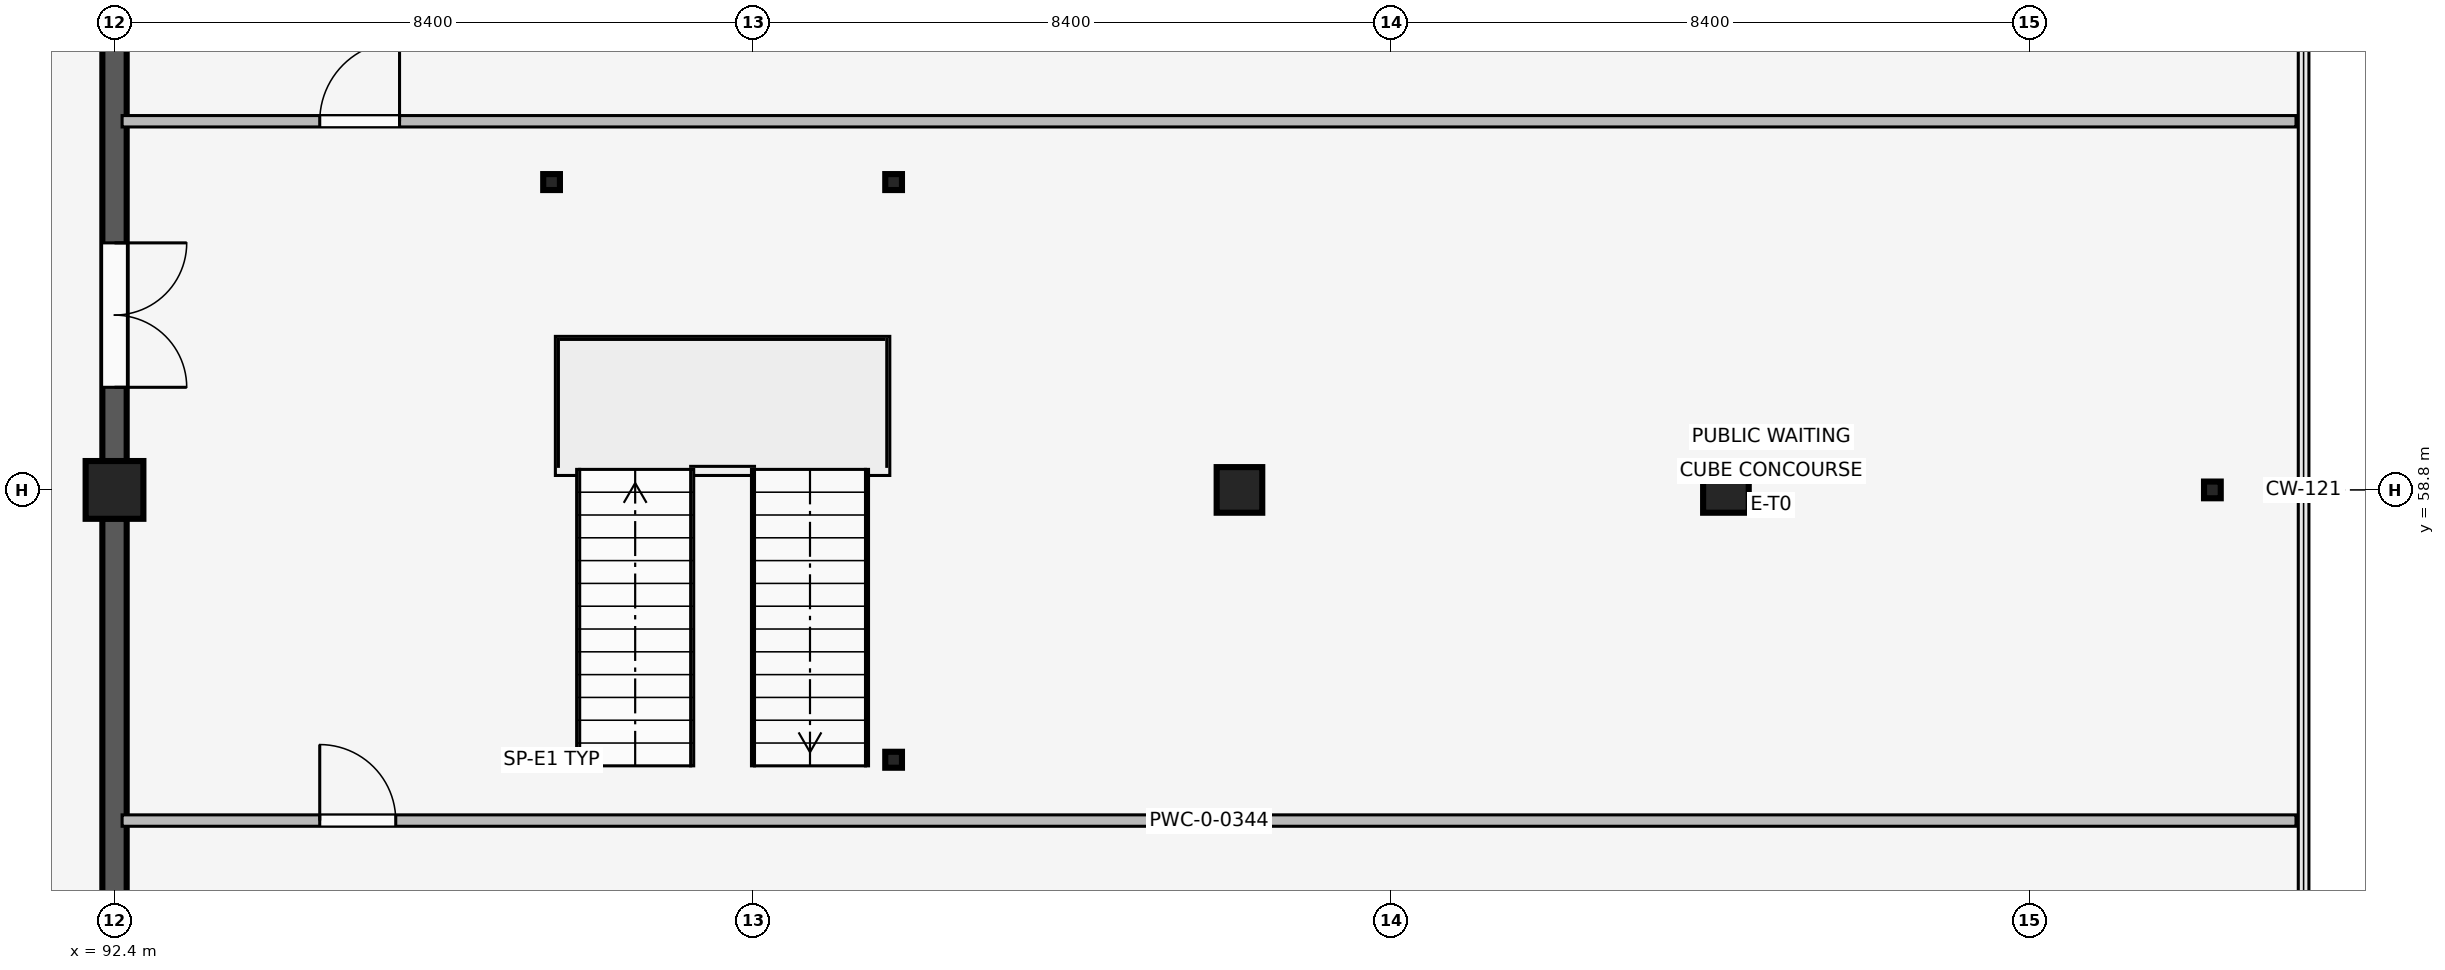
"""IFC4 building model, lengths in metres.
Left out: names, types, materials, properties, quantities, classifications, styles, units other than length and angle.
Written with IfcOpenShell. Run it as: python <this file> out.ifc"""

import sys

from ifc_helpers import new_model, si_unit, direction, frame, frame_2d, origin, origin_2d, place, context, subcontext, project, spatial, rectangle, i_section, extrude, element, fill, save


model = new_model("IFC4")
c1 = context("Model", 3, precision=1e-05, world=origin(), true_north=direction((0.0, 1.0)))
c2 = subcontext(c1, "Body", "Model", "MODEL_VIEW")
j1 = project(units=[si_unit("LENGTHUNIT", "METRE"), si_unit("PLANEANGLEUNIT", "RADIAN")], contexts=[c1])
p1 = place(None, origin())
s1 = spatial("IfcSite", under=j1, at=p1, CompositionType="ELEMENT")
p2 = place(p1, origin())
s2 = spatial("IfcBuilding", under=s1, at=p2, CompositionType="ELEMENT")
p3 = place(p2, origin())
s3 = spatial("IfcBuildingStorey", under=s2, at=p3, CompositionType="ELEMENT", Elevation=0.0)
p4 = place(p3, frame((92.4, 58.8, 0.0), z_axis=(0.0, 0.0, 1.0), x_axis=(1.0, 0.0, 0.0)))
e1 = element("IfcColumn", 1, at=p4, inside=s3, PredefinedType="COLUMN", context=c2, shape_type="SweptSolid", body=[
    extrude(rectangle(XDim=0.76, YDim=0.76, at=origin_2d()), origin(), (0.0, 0.0, 1.0), 4.8),
])
for number, where, z_axis, x_axis in (
    (2, (107.2, 58.8, 0.0), (0.0, 0.0, 1.0), (1.0, 0.0, 0.0)),
    (3, (113.6, 58.8, 0.0), (0.0, 0.0, 1.0), (1.0, 0.0, 0.0)),
):
    element("IfcColumn", number, at=place(p3, frame(where, z_axis=z_axis, x_axis=x_axis)), inside=s3, PredefinedType="COLUMN", context=c2, shape_type="SweptSolid", body=[
        extrude(rectangle(XDim=0.6, YDim=0.6, at=origin_2d()), origin(), (0.0, 0.0, 1.0), 4.8),
    ])
p5 = place(p3, frame((120.0, 58.8, 0.0), z_axis=(0.0, 0.0, 1.0), x_axis=(1.0, 0.0, 0.0)))
e4 = element("IfcColumn", 4, at=p5, inside=s3, PredefinedType="COLUMN", context=c2, shape_type="SweptSolid", body=[
    extrude(i_section(OverallWidth=0.22, OverallDepth=0.22, WebThickness=0.01, FlangeThickness=0.016, at=origin_2d()), origin(), (0.0, 0.0, 1.0), 4.8),
])
for number, where, z_axis, x_axis in (
    (5, (98.15, 55.25, 0.0), (0.0, 0.0, 1.0), (1.0, 0.0, 0.0)),
    (6, (102.65, 55.25, 0.0), (0.0, 0.0, 1.0), (1.0, 0.0, 0.0)),
    (7, (98.15, 62.85, 0.0), (0.0, 0.0, 1.0), (1.0, 0.0, 0.0)),
    (8, (102.65, 62.85, 0.0), (0.0, 0.0, 1.0), (1.0, 0.0, 0.0)),
):
    element("IfcColumn", number, at=place(p3, frame(where, z_axis=z_axis, x_axis=x_axis)), inside=s3, PredefinedType="COLUMN", context=c2, shape_type="SweptSolid", body=[
        extrude(i_section(OverallWidth=0.22, OverallDepth=0.21, WebThickness=0.007, FlangeThickness=0.011, at=origin_2d()), origin(), (0.0, 0.0, 1.0), 4.8),
    ])
p6 = place(p3, frame((92.4, 58.425, 0.0), z_axis=(0.0, 0.0, 1.0), x_axis=(0.0, -1.0, 0.0)))
e9 = element("IfcWall", 9, at=p6, inside=s3, PredefinedType="SOLIDWALL", context=c2, shape_type="SweptSolid", body=[
    extrude(rectangle(XDim=7.65, YDim=0.32, at=frame_2d((3.825, 0.0))), origin(), (0.0, 0.0, 1.0), 3.82),
])
p7 = place(p3, frame((92.4, 66.825, 0.0), z_axis=(0.0, 0.0, 1.0), x_axis=(0.0, -1.0, 0.0)))
e10 = element("IfcWall", 10, at=p7, inside=s3, PredefinedType="SOLIDWALL", context=c2, shape_type="SweptSolid", body=[
    extrude(rectangle(XDim=7.65, YDim=0.32, at=frame_2d((3.825, 0.0))), origin(), (0.0, 0.0, 1.0), 3.82),
])
p8 = place(p7, frame((4.775, 0.0, 0.0)))
e11 = element("IfcOpeningElement", 11, at=p8, cuts=e10, PredefinedType="OPENING", context=c2, shape_type="SweptSolid", body=[
    extrude(rectangle(XDim=1.9, YDim=2.4, at=frame_2d((0.95, 1.2))), frame((0.0, 0.17, 0.0), z_axis=(0.0, -1.0, 0.0), x_axis=(1.0, 0.0, 0.0)), (0.0, 0.0, 1.0), 0.34),
])
p9 = place(p3, frame((92.5, 54.45, 0.0), z_axis=(0.0, 0.0, 1.0), x_axis=(1.0, 0.0, 0.0)))
e12 = element("IfcWall", 12, at=p9, inside=s3, PredefinedType="PARTITIONING", context=c2, shape_type="SweptSolid", body=[
    extrude(rectangle(XDim=28.6, YDim=0.15, at=frame_2d((14.3, 0.0))), origin(), (0.0, 0.0, 1.0), 4.09),
])
p10 = place(p9, frame((2.6, 0.0, 0.0)))
e13 = element("IfcOpeningElement", 13, at=p10, cuts=e12, PredefinedType="OPENING", context=c2, shape_type="SweptSolid", body=[
    extrude(rectangle(XDim=1.0, YDim=2.15, at=frame_2d((0.5, 1.075))), frame((0.0, 0.085, 0.0), z_axis=(0.0, -1.0, 0.0), x_axis=(1.0, 0.0, 0.0)), (0.0, 0.0, 1.0), 0.17),
])
p11 = place(p3, frame((92.5, 63.65, 0.0), z_axis=(0.0, 0.0, 1.0), x_axis=(1.0, 0.0, 0.0)))
e14 = element("IfcWall", 14, at=p11, inside=s3, PredefinedType="PARTITIONING", context=c2, shape_type="SweptSolid", body=[
    extrude(rectangle(XDim=28.6, YDim=0.15, at=frame_2d((14.3, 0.0))), origin(), (0.0, 0.0, 1.0), 4.09),
])
p12 = place(p11, frame((2.6, 0.0, 0.0)))
e15 = element("IfcOpeningElement", 15, at=p12, cuts=e14, PredefinedType="OPENING", context=c2, shape_type="SweptSolid", body=[
    extrude(rectangle(XDim=1.05, YDim=2.2, at=frame_2d((0.525, 1.1))), frame((0.0, 0.085, 0.0), z_axis=(0.0, -1.0, 0.0), x_axis=(1.0, 0.0, 0.0)), (0.0, 0.0, 1.0), 0.17),
])
p13 = place(p8, origin())
e16 = element("IfcDoor", 16, at=p13, inside=s3, OperationType="DOUBLE_SWING_LEFT", PredefinedType="DOOR", context=c2, shape_type="SweptSolid", body=[
    extrude(rectangle(XDim=1.9, YDim=2.4, at=frame_2d((0.95, 1.2))), frame((0.0, 0.025, 0.0), z_axis=(0.0, -1.0, 0.0), x_axis=(1.0, 0.0, 0.0)), (0.0, 0.0, 1.0), 0.05),
])
fill(e11, e16)
p14 = place(p10, origin())
e17 = element("IfcDoor", 17, at=p14, inside=s3, OperationType="SINGLE_SWING_LEFT", PredefinedType="DOOR", context=c2, shape_type="SweptSolid", body=[
    extrude(rectangle(XDim=1.0, YDim=2.15, at=frame_2d((0.5, 1.075))), frame((0.0, 0.025, 0.0), z_axis=(0.0, -1.0, 0.0), x_axis=(1.0, 0.0, 0.0)), (0.0, 0.0, 1.0), 0.05),
])
fill(e13, e17)
p15 = place(p12, origin())
e18 = element("IfcDoor", 18, at=p15, inside=s3, OperationType="SINGLE_SWING_RIGHT", PredefinedType="DOOR", context=c2, shape_type="SweptSolid", body=[
    extrude(rectangle(XDim=1.05, YDim=2.2, at=frame_2d((0.525, 1.1))), frame((0.0, 0.025, 0.0), z_axis=(0.0, -1.0, 0.0), x_axis=(1.0, 0.0, 0.0)), (0.0, 0.0, 1.0), 0.05),
])
fill(e15, e18)
save(model, sys.argv[1])
